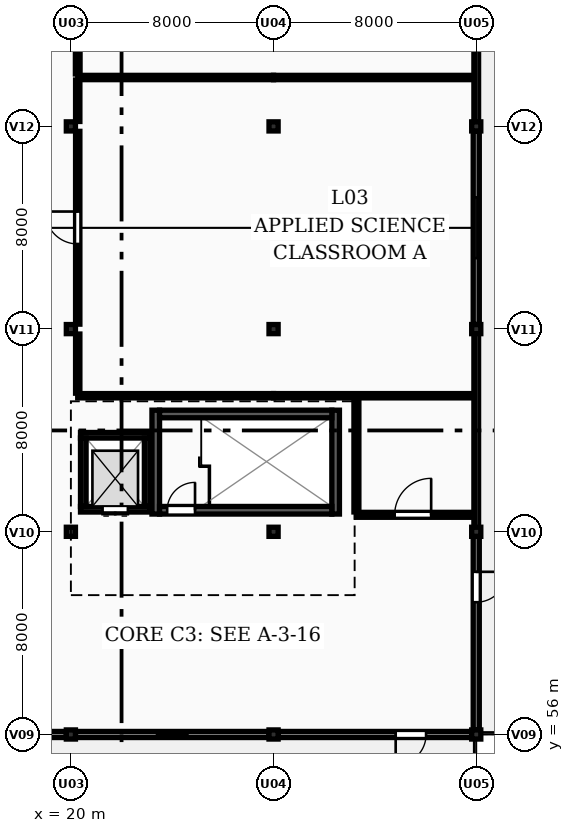
"""IFC4 building model, lengths in metres.
Left out: names, types, materials, properties, quantities, classifications, styles, units other than length and angle.
Written with IfcOpenShell. Run it as: python <this file> out.ifc"""

import sys

from ifc_helpers import new_model, si_unit, direction, frame, frame_2d, origin, origin_2d, place, context, subcontext, project, spatial, rectangle, extrude, element, fill, save


model = new_model("IFC4")
c1 = context("Model", 3, precision=1e-05, world=origin(), true_north=direction((0.0, 1.0)))
c2 = subcontext(c1, "Body", "Model", "MODEL_VIEW")
j1 = project(units=[si_unit("LENGTHUNIT", "METRE"), si_unit("PLANEANGLEUNIT", "RADIAN")], contexts=[c1])
p1 = place(None, origin())
s1 = spatial("IfcSite", under=j1, at=p1, CompositionType="ELEMENT")
p2 = place(p1, origin())
s2 = spatial("IfcBuilding", under=s1, at=p2, CompositionType="ELEMENT")
p3 = place(p2, frame((0.0, 0.0, 12.3)))
s3 = spatial("IfcBuildingStorey", under=s2, at=p3, CompositionType="ELEMENT", Elevation=12.3)
p4 = place(p3, frame((20.0, 56.0, 0.0), z_axis=(0.0, 0.0, 1.0), x_axis=(1.0, 0.0, 0.0)))
e1 = element("IfcColumn", 1, at=p4, inside=s3, PredefinedType="COLUMN", context=c2, shape_type="SweptSolid", body=[
    extrude(rectangle(XDim=0.36, YDim=0.36, at=origin_2d()), origin(), (0.0, 0.0, 1.0), 5.977),
])
p5 = place(p3, frame((20.0, 64.0, 0.0), z_axis=(0.0, 0.0, 1.0), x_axis=(1.0, 0.0, 0.0)))
e2 = element("IfcColumn", 2, at=p5, inside=s3, PredefinedType="COLUMN", context=c2, shape_type="SweptSolid", body=[
    extrude(rectangle(XDim=0.36, YDim=0.36, at=origin_2d()), origin(), (0.0, 0.0, 1.0), 5.448),
])
p6 = place(p3, frame((20.0, 72.0, 0.0), z_axis=(0.0, 0.0, 1.0), x_axis=(1.0, 0.0, 0.0)))
e3 = element("IfcColumn", 3, at=p6, inside=s3, PredefinedType="COLUMN", context=c2, shape_type="SweptSolid", body=[
    extrude(rectangle(XDim=0.36, YDim=0.36, at=origin_2d()), origin(), (0.0, 0.0, 1.0), 4.918),
])
p7 = place(p3, frame((20.0, 80.0, 0.0), z_axis=(0.0, 0.0, 1.0), x_axis=(1.0, 0.0, 0.0)))
e4 = element("IfcColumn", 4, at=p7, inside=s3, PredefinedType="COLUMN", context=c2, shape_type="SweptSolid", body=[
    extrude(rectangle(XDim=0.36, YDim=0.36, at=origin_2d()), origin(), (0.0, 0.0, 1.0), 4.928),
])
p8 = place(p3, frame((28.0, 56.0, 0.0), z_axis=(0.0, 0.0, 1.0), x_axis=(1.0, 0.0, 0.0)))
e5 = element("IfcColumn", 5, at=p8, inside=s3, PredefinedType="COLUMN", context=c2, shape_type="SweptSolid", body=[
    extrude(rectangle(XDim=0.36, YDim=0.36, at=origin_2d()), origin(), (0.0, 0.0, 1.0), 5.636),
])
p9 = place(p3, frame((28.0, 64.0, 0.0), z_axis=(0.0, 0.0, 1.0), x_axis=(1.0, 0.0, 0.0)))
e6 = element("IfcColumn", 6, at=p9, inside=s3, PredefinedType="COLUMN", context=c2, shape_type="SweptSolid", body=[
    extrude(rectangle(XDim=0.36, YDim=0.36, at=origin_2d()), origin(), (0.0, 0.0, 1.0), 5.106),
])
p10 = place(p3, frame((28.0, 72.0, 0.0), z_axis=(0.0, 0.0, 1.0), x_axis=(1.0, 0.0, 0.0)))
e7 = element("IfcColumn", 7, at=p10, inside=s3, PredefinedType="COLUMN", context=c2, shape_type="SweptSolid", body=[
    extrude(rectangle(XDim=0.36, YDim=0.36, at=origin_2d()), origin(), (0.0, 0.0, 1.0), 4.577),
])
p11 = place(p3, frame((28.0, 80.0, 0.0), z_axis=(0.0, 0.0, 1.0), x_axis=(1.0, 0.0, 0.0)))
e8 = element("IfcColumn", 8, at=p11, inside=s3, PredefinedType="COLUMN", context=c2, shape_type="SweptSolid", body=[
    extrude(rectangle(XDim=0.36, YDim=0.36, at=origin_2d()), origin(), (0.0, 0.0, 1.0), 4.587),
])
p12 = place(p3, frame((36.0, 56.0, 0.0), z_axis=(0.0, 0.0, 1.0), x_axis=(1.0, 0.0, 0.0)))
e9 = element("IfcColumn", 9, at=p12, inside=s3, PredefinedType="COLUMN", context=c2, shape_type="SweptSolid", body=[
    extrude(rectangle(XDim=0.36, YDim=0.36, at=origin_2d()), origin(), (0.0, 0.0, 1.0), 5.295),
])
p13 = place(p3, frame((36.0, 64.0, 0.0), z_axis=(0.0, 0.0, 1.0), x_axis=(1.0, 0.0, 0.0)))
e10 = element("IfcColumn", 10, at=p13, inside=s3, PredefinedType="COLUMN", context=c2, shape_type="SweptSolid", body=[
    extrude(rectangle(XDim=0.36, YDim=0.36, at=origin_2d()), origin(), (0.0, 0.0, 1.0), 4.765),
])
p14 = place(p3, frame((36.0, 72.0, 0.0), z_axis=(0.0, 0.0, 1.0), x_axis=(1.0, 0.0, 0.0)))
e11 = element("IfcColumn", 11, at=p14, inside=s3, PredefinedType="COLUMN", context=c2, shape_type="SweptSolid", body=[
    extrude(rectangle(XDim=0.36, YDim=0.36, at=origin_2d()), origin(), (0.0, 0.0, 1.0), 4.236),
])
p15 = place(p3, frame((36.0, 80.0, 0.0), z_axis=(0.0, 0.0, 1.0), x_axis=(1.0, 0.0, 0.0)))
e12 = element("IfcColumn", 12, at=p15, inside=s3, PredefinedType="COLUMN", context=c2, shape_type="SweptSolid", body=[
    extrude(rectangle(XDim=0.36, YDim=0.36, at=origin_2d()), origin(), (0.0, 0.0, 1.0), 4.246),
])
p16 = place(p3, frame((36.0, 87.82, 0.0), z_axis=(0.0, 0.0, 1.0), x_axis=(0.0, -1.0, 0.0)))
e13 = element("IfcWall", 13, at=p16, inside=s3, PredefinedType="SOLIDWALL", context=c2, shape_type="SweptSolid", body=[
    extrude(rectangle(XDim=7.64, YDim=0.185, at=frame_2d((3.82, 0.0))), origin(), (0.0, 0.0, 1.0), 0.95),
])
p17 = place(p3, frame((36.0, 79.82, 0.0), z_axis=(0.0, 0.0, 1.0), x_axis=(0.0, -1.0, 0.0)))
e14 = element("IfcWall", 14, at=p17, inside=s3, PredefinedType="SOLIDWALL", context=c2, shape_type="SweptSolid", body=[
    extrude(rectangle(XDim=7.64, YDim=0.24, at=frame_2d((3.82, 0.0))), origin(), (0.0, 0.0, 1.0), 3.381),
])
p18 = place(p17, frame((2.62, 0.0, 0.95)))
e15 = element("IfcOpeningElement", 15, at=p18, cuts=e14, PredefinedType="OPENING", context=c2, shape_type="SweptSolid", body=[
    extrude(rectangle(XDim=2.4, YDim=1.35, at=frame_2d((1.2, 0.675))), frame((0.0, 0.13, 0.0), z_axis=(0.0, -1.0, 0.0), x_axis=(1.0, 0.0, 0.0)), (0.0, 0.0, 1.0), 0.26),
])
p19 = place(p3, frame((36.0, 71.82, 0.0), z_axis=(0.0, 0.0, 1.0), x_axis=(0.0, -1.0, 0.0)))
e16 = element("IfcWall", 16, at=p19, inside=s3, PredefinedType="SOLIDWALL", context=c2, shape_type="SweptSolid", body=[
    extrude(rectangle(XDim=7.64, YDim=0.185, at=frame_2d((3.82, 0.0))), origin(), (0.0, 0.0, 1.0), 0.95),
])
p20 = place(p3, frame((36.0, 63.82, 0.0), z_axis=(0.0, 0.0, 1.0), x_axis=(0.0, -1.0, 0.0)))
e17 = element("IfcWall", 17, at=p20, inside=s3, PredefinedType="SOLIDWALL", context=c2, shape_type="SweptSolid", body=[
    extrude(rectangle(XDim=7.64, YDim=0.24, at=frame_2d((3.82, 0.0))), origin(), (0.0, 0.0, 1.0), 4.187),
])
p21 = place(p20, frame((1.4, 0.0, 0.0)))
e18 = element("IfcOpeningElement", 18, at=p21, cuts=e17, PredefinedType="OPENING", context=c2, shape_type="SweptSolid", body=[
    extrude(rectangle(XDim=1.2, YDim=2.15, at=frame_2d((0.6, 1.075))), frame((0.0, 0.13, 0.0), z_axis=(0.0, -1.0, 0.0), x_axis=(1.0, 0.0, 0.0)), (0.0, 0.0, 1.0), 0.26),
])
p22 = place(p3, frame((35.82, 56.0, 0.0), z_axis=(0.0, 0.0, 1.0), x_axis=(-1.0, 0.0, 0.0)))
e19 = element("IfcWall", 19, at=p22, inside=s3, PredefinedType="SOLIDWALL", context=c2, shape_type="SweptSolid", body=[
    extrude(rectangle(XDim=7.64, YDim=0.24, at=frame_2d((3.82, 0.0))), origin(), (0.0, 0.0, 1.0), 4.712),
])
p23 = place(p22, frame((1.8, 0.0, 0.0)))
e20 = element("IfcOpeningElement", 20, at=p23, cuts=e19, PredefinedType="OPENING", context=c2, shape_type="SweptSolid", body=[
    extrude(rectangle(XDim=1.2, YDim=2.15, at=frame_2d((0.6, 1.075))), frame((0.0, 0.13, 0.0), z_axis=(0.0, -1.0, 0.0), x_axis=(1.0, 0.0, 0.0)), (0.0, 0.0, 1.0), 0.26),
])
p24 = place(p3, frame((27.82, 56.0, 0.0), z_axis=(0.0, 0.0, 1.0), x_axis=(-1.0, 0.0, 0.0)))
e21 = element("IfcWall", 21, at=p24, inside=s3, PredefinedType="SOLIDWALL", context=c2, shape_type="SweptSolid", body=[
    extrude(rectangle(XDim=7.64, YDim=0.24, at=frame_2d((3.82, 0.0))), origin(), (0.0, 0.0, 1.0), 5.054),
])
p25 = place(p24, frame((3.22, 0.0, 0.95)))
e22 = element("IfcOpeningElement", 22, at=p25, cuts=e21, PredefinedType="OPENING", context=c2, shape_type="SweptSolid", body=[
    extrude(rectangle(XDim=1.2, YDim=1.2, at=frame_2d((0.6, 0.6))), frame((0.0, 0.13, 0.0), z_axis=(0.0, -1.0, 0.0), x_axis=(1.0, 0.0, 0.0)), (0.0, 0.0, 1.0), 0.26),
])
p26 = place(p3, frame((19.82, 56.0, 0.0), z_axis=(0.0, 0.0, 1.0), x_axis=(-1.0, 0.0, 0.0)))
e23 = element("IfcWall", 23, at=p26, inside=s3, PredefinedType="SOLIDWALL", context=c2, shape_type="SweptSolid", body=[
    extrude(rectangle(XDim=7.64, YDim=0.24, at=frame_2d((3.82, 0.0))), origin(), (0.0, 0.0, 1.0), 5.395),
])
for number, where, z_axis, x_axis in (
    (24, (23.35, 64.7, 0.0), (0.0, 0.0, 1.0), (0.0, 1.0, 0.0)),
    (25, (30.45, 68.8, 0.0), (0.0, 0.0, 1.0), (0.0, -1.0, 0.0)),
):
    element("IfcWall", number, at=place(p3, frame(where, z_axis=z_axis, x_axis=x_axis)), inside=s3, PredefinedType="SHEAR", context=c2, shape_type="SweptSolid", body=[
        extrude(rectangle(XDim=4.1, YDim=0.3, at=frame_2d((2.05, 0.0))), origin(), (0.0, 0.0, 1.0), 5.565),
    ])
p27 = place(p3, frame((23.5, 64.85, 0.0), z_axis=(0.0, 0.0, 1.0), x_axis=(1.0, 0.0, 0.0)))
e26 = element("IfcWall", 26, at=p27, inside=s3, PredefinedType="SHEAR", context=c2, shape_type="SweptSolid", body=[
    extrude(rectangle(XDim=6.8, YDim=0.3, at=frame_2d((3.4, 0.0))), origin(), (0.0, 0.0, 1.0), 5.565),
])
p28 = place(p27, frame((0.3, 0.0, 0.0)))
e27 = element("IfcOpeningElement", 27, at=p28, cuts=e26, PredefinedType="OPENING", context=c2, shape_type="SweptSolid", body=[
    extrude(rectangle(XDim=1.1, YDim=2.15, at=frame_2d((0.55, 1.075))), frame((0.0, 0.16, 0.0), z_axis=(0.0, -1.0, 0.0), x_axis=(1.0, 0.0, 0.0)), (0.0, 0.0, 1.0), 0.32),
])
p29 = place(p3, frame((30.3, 68.65, 0.0), z_axis=(0.0, 0.0, 1.0), x_axis=(-1.0, 0.0, 0.0)))
e28 = element("IfcWall", 28, at=p29, inside=s3, PredefinedType="SHEAR", context=c2, shape_type="SweptSolid", body=[
    extrude(rectangle(XDim=6.8, YDim=0.3, at=frame_2d((3.4, 0.0))), origin(), (0.0, 0.0, 1.0), 5.565),
])
p30 = place(p3, frame((23.12, 64.89, 0.0), z_axis=(0.0, 0.0, 1.0), x_axis=(-1.0, 0.0, 0.0)))
e29 = element("IfcWall", 29, at=p30, inside=s3, PredefinedType="SHEAR", context=c2, shape_type="SweptSolid", body=[
    extrude(rectangle(XDim=2.74, YDim=0.22, at=frame_2d((1.37, 0.0))), origin(), (0.0, 0.0, 1.0), 5.806),
])
p31 = place(p30, frame((0.87, 0.0, 0.0)))
e30 = element("IfcOpeningElement", 30, at=p31, cuts=e29, PredefinedType="OPENING", context=c2, shape_type="SweptSolid", body=[
    extrude(rectangle(XDim=1.0, YDim=2.15, at=frame_2d((0.5, 1.075))), frame((0.0, 0.12, 0.0), z_axis=(0.0, -1.0, 0.0), x_axis=(1.0, 0.0, 0.0)), (0.0, 0.0, 1.0), 0.24),
])
p32 = place(p3, frame((20.38, 67.81, 0.0), z_axis=(0.0, 0.0, 1.0), x_axis=(1.0, 0.0, 0.0)))
e31 = element("IfcWall", 31, at=p32, inside=s3, PredefinedType="SHEAR", context=c2, shape_type="SweptSolid", body=[
    extrude(rectangle(XDim=2.74, YDim=0.22, at=frame_2d((1.37, 0.0))), origin(), (0.0, 0.0, 1.0), 5.806),
])
for number, where, z_axis, x_axis in (
    (32, (20.49, 65.0, 0.0), (0.0, 0.0, 1.0), (0.0, 1.0, 0.0)),
    (33, (23.01, 67.7, 0.0), (0.0, 0.0, 1.0), (0.0, -1.0, 0.0)),
):
    element("IfcWall", number, at=place(p3, frame(where, z_axis=z_axis, x_axis=x_axis)), inside=s3, PredefinedType="SHEAR", context=c2, shape_type="SweptSolid", body=[
        extrude(rectangle(XDim=2.7, YDim=0.22, at=frame_2d((1.35, 0.0))), origin(), (0.0, 0.0, 1.0), 5.806),
    ])
p33 = place(p3, frame((20.27, 69.37, 0.0), z_axis=(0.0, 0.0, 1.0), x_axis=(1.0, 0.0, 0.0)))
e34 = element("IfcWall", 34, at=p33, inside=s3, PredefinedType="PARTITIONING", context=c2, shape_type="SweptSolid", body=[
    extrude(rectangle(XDim=7.73, YDim=0.17, at=frame_2d((3.865, 0.0))), origin(), (0.0, 0.0, 1.0), 3.65),
])
p34 = place(p3, frame((28.0, 69.37, 0.0), z_axis=(0.0, 0.0, 1.0), x_axis=(1.0, 0.0, 0.0)))
e35 = element("IfcWall", 35, at=p34, inside=s3, PredefinedType="PARTITIONING", context=c2, shape_type="SweptSolid", body=[
    extrude(rectangle(XDim=7.865, YDim=0.17, at=frame_2d((3.933, 0.0))), origin(), (0.0, 0.0, 1.0), 3.65),
])
p35 = place(p3, frame((20.27, 81.93, 0.0), z_axis=(0.0, 0.0, 1.0), x_axis=(1.0, 0.0, 0.0)))
e36 = element("IfcWall", 36, at=p35, inside=s3, PredefinedType="PARTITIONING", context=c2, shape_type="SweptSolid", body=[
    extrude(rectangle(XDim=7.73, YDim=0.17, at=frame_2d((3.865, 0.0))), origin(), (0.0, 0.0, 1.0), 3.65),
])
p36 = place(p3, frame((28.0, 81.93, 0.0), z_axis=(0.0, 0.0, 1.0), x_axis=(1.0, 0.0, 0.0)))
e37 = element("IfcWall", 37, at=p36, inside=s3, PredefinedType="PARTITIONING", context=c2, shape_type="SweptSolid", body=[
    extrude(rectangle(XDim=7.865, YDim=0.17, at=frame_2d((3.933, 0.0))), origin(), (0.0, 0.0, 1.0), 3.65),
])
p37 = place(p3, frame((20.27, 69.47, 0.0), z_axis=(0.0, 0.0, 1.0), x_axis=(0.0, 1.0, 0.0)))
e38 = element("IfcWall", 38, at=p37, inside=s3, PredefinedType="PARTITIONING", context=c2, shape_type="SweptSolid", body=[
    extrude(rectangle(XDim=2.335, YDim=0.17, at=frame_2d((1.167, 0.0))), origin(), (0.0, 0.0, 1.0), 3.65),
])
p38 = place(p3, frame((20.27, 72.195, 0.0), z_axis=(0.0, 0.0, 1.0), x_axis=(0.0, 1.0, 0.0)))
e39 = element("IfcWall", 39, at=p38, inside=s3, PredefinedType="PARTITIONING", context=c2, shape_type="SweptSolid", body=[
    extrude(rectangle(XDim=7.61, YDim=0.17, at=frame_2d((3.805, 0.0))), origin(), (0.0, 0.0, 1.0), 3.65),
])
p39 = place(p38, frame((3.165, 0.0, 0.0)))
e40 = element("IfcOpeningElement", 40, at=p39, cuts=e39, PredefinedType="OPENING", context=c2, shape_type="SweptSolid", body=[
    extrude(rectangle(XDim=1.28, YDim=2.15, at=frame_2d((0.64, 1.075))), frame((0.0, 0.095, 0.0), z_axis=(0.0, -1.0, 0.0), x_axis=(1.0, 0.0, 0.0)), (0.0, 0.0, 1.0), 0.19),
])
p40 = place(p3, frame((20.27, 80.195, 0.0), z_axis=(0.0, 0.0, 1.0), x_axis=(0.0, 1.0, 0.0)))
e41 = element("IfcWall", 41, at=p40, inside=s3, PredefinedType="PARTITIONING", context=c2, shape_type="SweptSolid", body=[
    extrude(rectangle(XDim=1.635, YDim=0.17, at=frame_2d((0.817, 0.0))), origin(), (0.0, 0.0, 1.0), 3.65),
])
p41 = place(p3, frame((20.27, 82.07, 0.0), z_axis=(0.0, 0.0, 1.0), x_axis=(0.0, 1.0, 0.0)))
e42 = element("IfcWall", 42, at=p41, inside=s3, PredefinedType="PARTITIONING", context=c2, shape_type="SweptSolid", body=[
    extrude(rectangle(XDim=5.735, YDim=0.185, at=frame_2d((2.867, 0.0))), origin(), (0.0, 0.0, 1.0), 3.65),
])
p42 = place(p3, frame((31.27, 64.67, 0.0), z_axis=(0.0, 0.0, 1.0), x_axis=(1.0, 0.0, 0.0)))
e43 = element("IfcWall", 43, at=p42, inside=s3, PredefinedType="PARTITIONING", context=c2, shape_type="SweptSolid", body=[
    extrude(rectangle(XDim=4.595, YDim=0.195, at=frame_2d((2.298, 0.0))), origin(), (0.0, 0.0, 1.0), 3.65),
])
p43 = place(p42, frame((1.51, 0.0, 0.0)))
e44 = element("IfcOpeningElement", 44, at=p43, cuts=e43, PredefinedType="OPENING", context=c2, shape_type="SweptSolid", body=[
    extrude(rectangle(XDim=1.44, YDim=2.15, at=frame_2d((0.72, 1.075))), frame((0.0, 0.107, 0.0), z_axis=(0.0, -1.0, 0.0), x_axis=(1.0, 0.0, 0.0)), (0.0, 0.0, 1.0), 0.215),
])
p44 = place(p3, frame((31.27, 64.782, 0.0), z_axis=(0.0, 0.0, 1.0), x_axis=(0.0, 1.0, 0.0)))
e45 = element("IfcWall", 45, at=p44, inside=s3, PredefinedType="PARTITIONING", context=c2, shape_type="SweptSolid", body=[
    extrude(rectangle(XDim=4.448, YDim=0.195, at=frame_2d((2.224, 0.0))), origin(), (0.0, 0.0, 1.0), 3.65),
])
p45 = place(p18, origin())
e46 = element("IfcWindow", 46, at=p45, inside=s3, PartitioningType="DOUBLE_PANEL_VERTICAL", PredefinedType="WINDOW", context=c2, shape_type="SweptSolid", body=[
    extrude(rectangle(XDim=2.4, YDim=1.35, at=frame_2d((1.2, 0.675))), frame((0.0, 0.03, 0.0), z_axis=(0.0, -1.0, 0.0), x_axis=(1.0, 0.0, 0.0)), (0.0, 0.0, 1.0), 0.06),
])
fill(e15, e46)
p46 = place(p21, origin())
e47 = element("IfcDoor", 47, at=p46, inside=s3, OperationType="SINGLE_SWING_LEFT", PredefinedType="DOOR", context=c2, shape_type="SweptSolid", body=[
    extrude(rectangle(XDim=1.2, YDim=2.15, at=frame_2d((0.6, 1.075))), frame((0.0, 0.025, 0.0), z_axis=(0.0, -1.0, 0.0), x_axis=(1.0, 0.0, 0.0)), (0.0, 0.0, 1.0), 0.05),
])
fill(e18, e47)
p47 = place(p23, origin())
e48 = element("IfcDoor", 48, at=p47, inside=s3, OperationType="SINGLE_SWING_RIGHT", PredefinedType="DOOR", context=c2, shape_type="SweptSolid", body=[
    extrude(rectangle(XDim=1.2, YDim=2.15, at=frame_2d((0.6, 1.075))), frame((0.0, 0.025, 0.0), z_axis=(0.0, -1.0, 0.0), x_axis=(1.0, 0.0, 0.0)), (0.0, 0.0, 1.0), 0.05),
])
fill(e20, e48)
p48 = place(p25, origin())
e49 = element("IfcWindow", 49, at=p48, inside=s3, PartitioningType="SINGLE_PANEL", PredefinedType="WINDOW", context=c2, shape_type="SweptSolid", body=[
    extrude(rectangle(XDim=1.2, YDim=1.2, at=frame_2d((0.6, 0.6))), frame((0.0, 0.03, 0.0), z_axis=(0.0, -1.0, 0.0), x_axis=(1.0, 0.0, 0.0)), (0.0, 0.0, 1.0), 0.06),
])
fill(e22, e49)
p49 = place(p28, origin())
e50 = element("IfcDoor", 50, at=p49, inside=s3, OperationType="SINGLE_SWING_RIGHT", PredefinedType="DOOR", context=c2, shape_type="SweptSolid", body=[
    extrude(rectangle(XDim=1.1, YDim=2.15, at=frame_2d((0.55, 1.075))), frame((0.0, 0.025, 0.0), z_axis=(0.0, -1.0, 0.0), x_axis=(1.0, 0.0, 0.0)), (0.0, 0.0, 1.0), 0.05),
])
fill(e27, e50)
p50 = place(p31, origin())
e51 = element("IfcDoor", 51, at=p50, inside=s3, OperationType="DOUBLE_DOOR_SLIDING", PredefinedType="DOOR", context=c2, shape_type="SweptSolid", body=[
    extrude(rectangle(XDim=1.0, YDim=2.15, at=frame_2d((0.5, 1.075))), frame((0.0, 0.025, 0.0), z_axis=(0.0, -1.0, 0.0), x_axis=(1.0, 0.0, 0.0)), (0.0, 0.0, 1.0), 0.05),
])
fill(e30, e51)
p51 = place(p39, origin())
e52 = element("IfcDoor", 52, at=p51, inside=s3, OperationType="SINGLE_SWING_RIGHT", PredefinedType="DOOR", context=c2, shape_type="SweptSolid", body=[
    extrude(rectangle(XDim=1.28, YDim=2.15, at=frame_2d((0.64, 1.075))), frame((0.0, 0.025, 0.0), z_axis=(0.0, -1.0, 0.0), x_axis=(1.0, 0.0, 0.0)), (0.0, 0.0, 1.0), 0.05),
])
fill(e40, e52)
p52 = place(p43, origin())
e53 = element("IfcDoor", 53, at=p52, inside=s3, OperationType="SINGLE_SWING_RIGHT", PredefinedType="DOOR", context=c2, shape_type="SweptSolid", body=[
    extrude(rectangle(XDim=1.44, YDim=2.15, at=frame_2d((0.72, 1.075))), frame((0.0, 0.025, 0.0), z_axis=(0.0, -1.0, 0.0), x_axis=(1.0, 0.0, 0.0)), (0.0, 0.0, 1.0), 0.05),
])
fill(e44, e53)
save(model, sys.argv[1])
